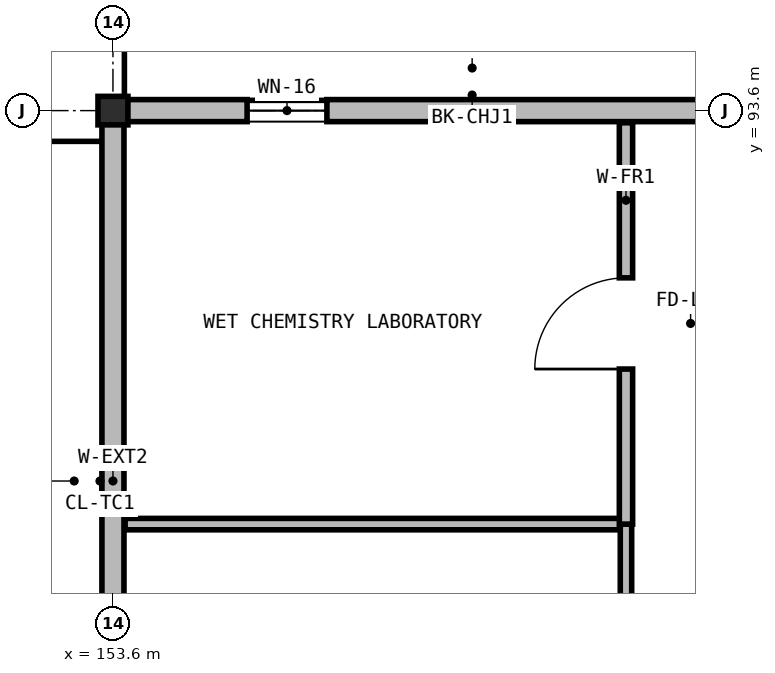
"""IFC4 building model, lengths in metres.
Left out: names, types, materials, properties, quantities, classifications, styles, units other than length and angle.
Written with IfcOpenShell. Run it as: python <this file> out.ifc"""

import sys

from ifc_helpers import new_model, si_unit, direction, frame, frame_2d, origin, origin_2d, place, context, subcontext, project, spatial, rectangle, i_section, extrude, element, fill, save


model = new_model("IFC4")
c1 = context("Model", 3, precision=1e-05, world=origin(), true_north=direction((0.0, 1.0)))
c2 = subcontext(c1, "Body", "Model", "MODEL_VIEW")
j1 = project(units=[si_unit("LENGTHUNIT", "METRE"), si_unit("PLANEANGLEUNIT", "RADIAN")], contexts=[c1])
p1 = place(None, origin())
s1 = spatial("IfcSite", under=j1, at=p1, CompositionType="ELEMENT")
p2 = place(p1, origin())
s2 = spatial("IfcBuilding", under=s1, at=p2, CompositionType="ELEMENT")
p3 = place(p2, frame((0.0, 0.0, 14.35)))
s3 = spatial("IfcBuildingStorey", under=s2, at=p3, CompositionType="ELEMENT", Elevation=14.35)
p4 = place(p3, frame((153.6, 93.6, 0.0), z_axis=(0.0, 0.0, 1.0), x_axis=(1.0, 0.0, 0.0)))
e1 = element("IfcColumn", 1, at=p4, inside=s3, PredefinedType="COLUMN", context=c2, shape_type="SweptSolid", body=[
    extrude(i_section(OverallWidth=0.394, OverallDepth=0.375, WebThickness=0.02, FlangeThickness=0.032, at=origin_2d()), origin(), (0.0, 0.0, 1.0), 4.55),
])
p5 = place(p3, frame((153.6, 84.004, 0.0), z_axis=(0.0, 0.0, 1.0), x_axis=(0.0, 1.0, 0.0)))
e2 = element("IfcWall", 2, at=p5, inside=s3, PredefinedType="SOLIDWALL", context=c2, shape_type="SweptSolid", body=[
    extrude(rectangle(XDim=9.447, YDim=0.29, at=frame_2d((4.724, 0.0))), origin(), (0.0, 0.0, 1.0), 3.847),
])
p6 = place(p3, frame((153.455, 93.6, 0.0), z_axis=(0.0, 0.0, 1.0), x_axis=(1.0, 0.0, 0.0)))
e3 = element("IfcWall", 3, at=p6, inside=s3, PredefinedType="SOLIDWALL", context=c2, shape_type="SweptSolid", body=[
    extrude(rectangle(XDim=9.741, YDim=0.29, at=frame_2d((4.871, 0.0))), origin(), (0.0, 0.0, 1.0), 3.764),
])
p7 = place(p6, frame((1.91, 0.0, 0.95)))
e4 = element("IfcOpeningElement", 4, at=p7, cuts=e3, PredefinedType="OPENING", context=c2, shape_type="SweptSolid", body=[
    extrude(rectangle(XDim=1.05, YDim=1.8, at=frame_2d((0.525, 0.9))), frame((0.0, 0.155, 0.0), z_axis=(0.0, -1.0, 0.0), x_axis=(1.0, 0.0, 0.0)), (0.0, 0.0, 1.0), 0.31),
])
p8 = place(p3, frame((160.35, 79.36, 0.0), z_axis=(0.0, 0.0, 1.0), x_axis=(0.0, 1.0, 0.0)))
e5 = element("IfcWall", 5, at=p8, inside=s3, PredefinedType="PARTITIONING", context=c2, shape_type="SweptSolid", body=[
    extrude(rectangle(XDim=8.8, YDim=0.15, at=frame_2d((4.4, 0.0))), origin(), (0.0, 0.0, 1.0), 4.3),
])
p9 = place(p8, frame((5.79, 0.0, 0.0)))
e6 = element("IfcOpeningElement", 6, at=p9, cuts=e5, PredefinedType="OPENING", context=c2, shape_type="SweptSolid", body=[
    extrude(rectangle(XDim=1.0, YDim=2.2, at=frame_2d((0.5, 1.1))), frame((0.0, 0.085, 0.0), z_axis=(0.0, -1.0, 0.0), x_axis=(1.0, 0.0, 0.0)), (0.0, 0.0, 1.0), 0.17),
])
p10 = place(p3, frame((153.76, 88.16, 0.0), z_axis=(0.0, 0.0, 1.0), x_axis=(1.0, 0.0, 0.0)))
e7 = element("IfcWall", 7, at=p10, inside=s3, PredefinedType="PARTITIONING", context=c2, shape_type="SweptSolid", body=[
    extrude(rectangle(XDim=6.51, YDim=0.15, at=frame_2d((3.255, 0.0))), origin(), (0.0, 0.0, 1.0), 4.3),
])
p11 = place(p3, frame((160.35, 88.16, 0.0), z_axis=(0.0, 0.0, 1.0), x_axis=(0.0, 1.0, 0.0)))
e8 = element("IfcWall", 8, at=p11, inside=s3, PredefinedType="PARTITIONING", context=c2, shape_type="SweptSolid", body=[
    extrude(rectangle(XDim=5.28, YDim=0.175, at=frame_2d((2.64, 0.0))), origin(), (0.0, 0.0, 1.0), 4.3),
])
p12 = place(p11, frame((2.04, 0.0, 0.0)))
e9 = element("IfcOpeningElement", 9, at=p12, cuts=e8, PredefinedType="OPENING", context=c2, shape_type="SweptSolid", body=[
    extrude(rectangle(XDim=1.2, YDim=2.2, at=frame_2d((0.6, 1.1))), frame((0.0, 0.097, 0.0), z_axis=(0.0, -1.0, 0.0), x_axis=(1.0, 0.0, 0.0)), (0.0, 0.0, 1.0), 0.195),
])
p13 = place(p7, origin())
e10 = element("IfcWindow", 10, at=p13, inside=s3, PartitioningType="SINGLE_PANEL", PredefinedType="WINDOW", context=c2, shape_type="SweptSolid", body=[
    extrude(rectangle(XDim=1.05, YDim=1.8, at=frame_2d((0.525, 0.9))), frame((0.0, 0.03, 0.0), z_axis=(0.0, -1.0, 0.0), x_axis=(1.0, 0.0, 0.0)), (0.0, 0.0, 1.0), 0.06),
])
fill(e4, e10)
p14 = place(p12, origin())
e11 = element("IfcDoor", 11, at=p14, inside=s3, OperationType="SINGLE_SWING_LEFT", PredefinedType="DOOR", context=c2, shape_type="SweptSolid", body=[
    extrude(rectangle(XDim=1.2, YDim=2.2, at=frame_2d((0.6, 1.1))), frame((0.0, 0.025, 0.0), z_axis=(0.0, -1.0, 0.0), x_axis=(1.0, 0.0, 0.0)), (0.0, 0.0, 1.0), 0.05),
])
fill(e9, e11)
save(model, sys.argv[1])
